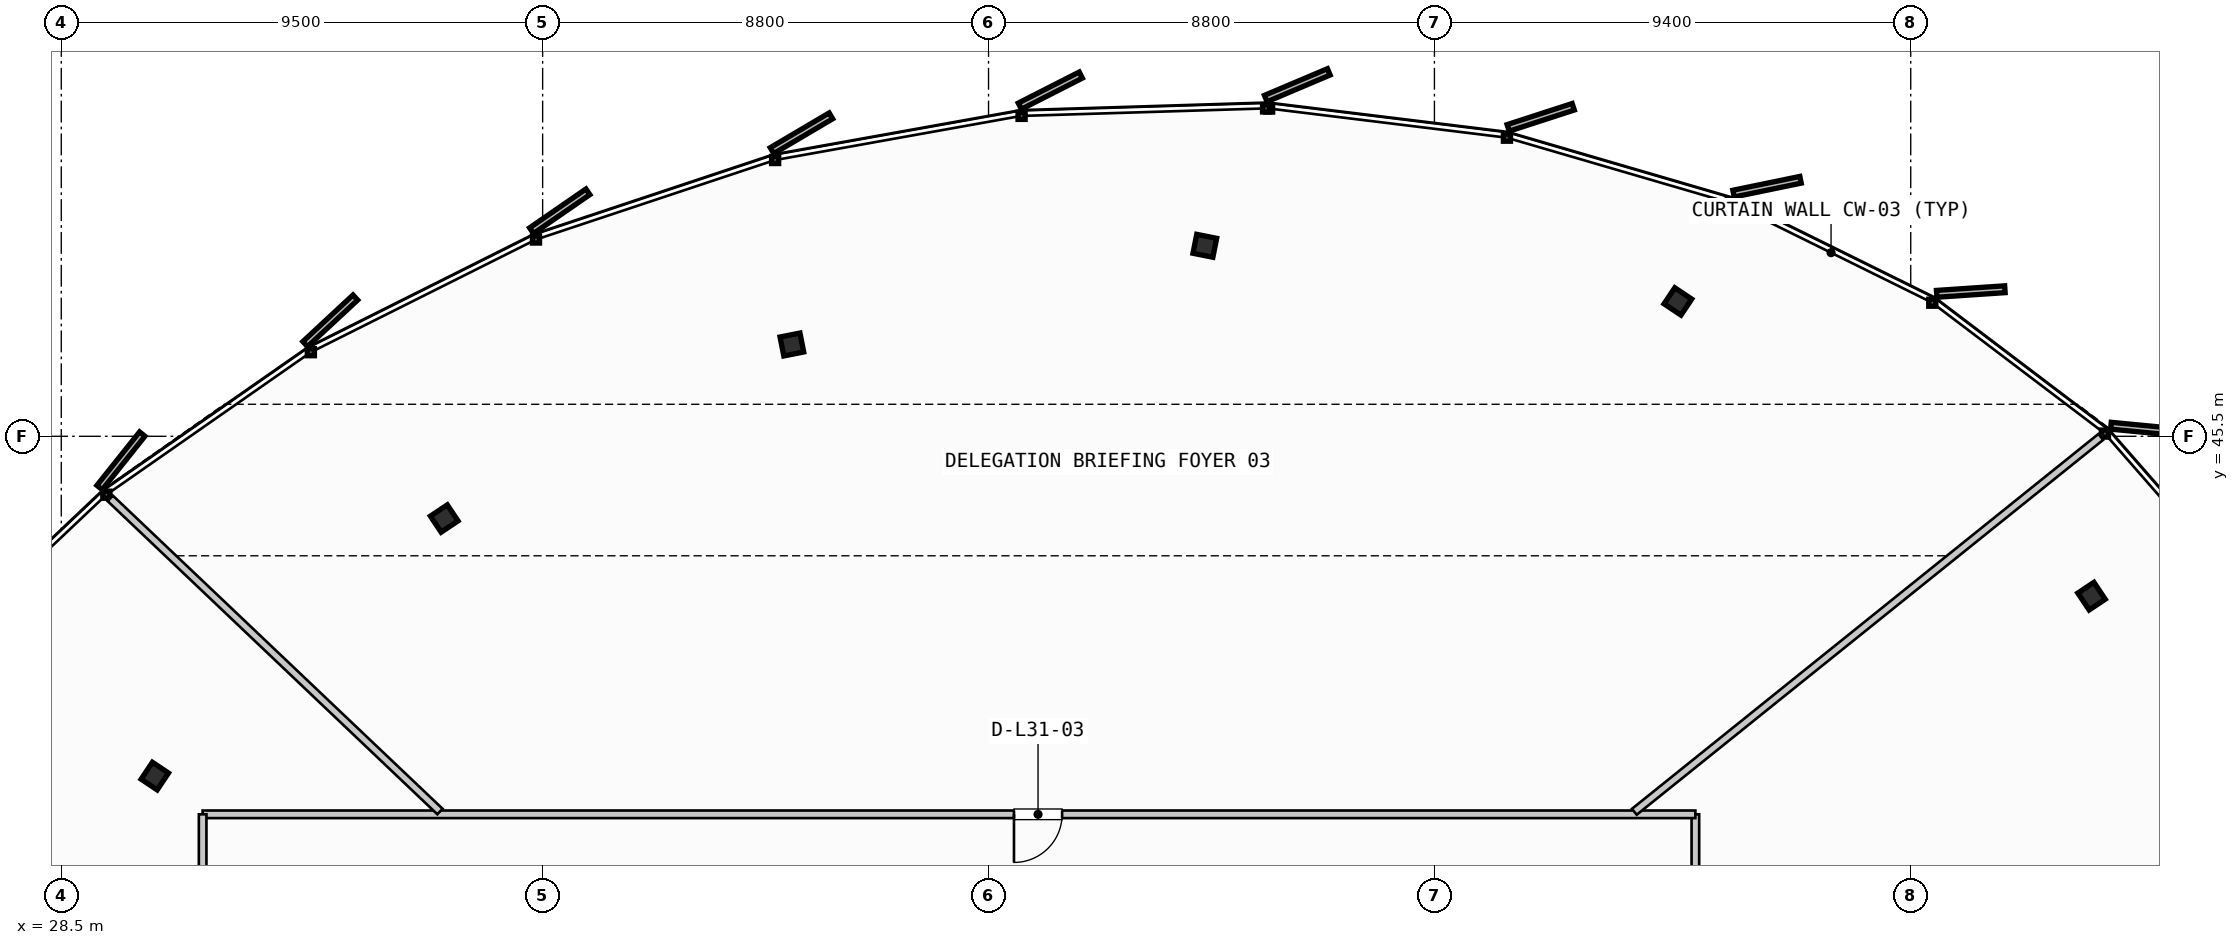
"""IFC4 building model, lengths in metres.
Left out: names, types, materials, properties, quantities, classifications, styles, units other than length and angle.
Written with IfcOpenShell. Run it as: python <this file> out.ifc"""

import sys

from ifc_helpers import new_model, si_unit, direction, frame, frame_2d, origin, origin_2d, place, context, subcontext, project, spatial, rectangle, i_section, extrude, source, transform, mapped, element, fill, save


model = new_model("IFC4")
c1 = context("Model", 3, precision=1e-05, world=origin(), true_north=direction((0.0, 1.0)))
c2 = subcontext(c1, "Body", "Model", "MODEL_VIEW")
j1 = project(units=[si_unit("LENGTHUNIT", "METRE"), si_unit("PLANEANGLEUNIT", "RADIAN")], contexts=[c1])
p1 = place(None, origin())
s1 = spatial("IfcSite", under=j1, at=p1, CompositionType="ELEMENT")
p2 = place(p1, origin())
s2 = spatial("IfcBuilding", under=s1, at=p2, CompositionType="ELEMENT")
p3 = place(p2, frame((0.0, 0.0, 125.2)))
s3 = spatial("IfcBuildingStorey", under=s2, at=p3, CompositionType="ELEMENT", Elevation=125.2)
m1 = source(origin(), c2, "Body", "SweptSolid", [
    extrude(i_section(OverallWidth=0.401, OverallDepth=0.381, WebThickness=0.032, FlangeThickness=0.051, FilletRadius=0.015, at=origin_2d()), origin(), (0.0, 0.0, 1.0), 3.35),
])
for number, where, z_axis, x_axis in (
    (1, (68.569, 42.345, 0.0), (0.0, 0.0, 1.0), (0.831, 0.556, 0.0)),
    (2, (60.405, 48.161, 0.0), (0.0, 0.0, 1.0), (0.556, 0.831, 0.0)),
    (3, (51.069, 49.259, 0.0), (0.0, 0.0, 1.0), (0.195, 0.981, 0.0)),
    (4, (42.919, 47.311, 0.0), (0.0, 0.0, 1.0), (-0.195, 0.981, 0.0)),
    (5, (36.058, 43.877, 0.0), (0.0, 0.0, 1.0), (-0.556, 0.831, 0.0)),
    (6, (30.346, 38.794, 0.0), (0.0, 0.0, 1.0), (-0.831, 0.556, 0.0)),
):
    element("IfcColumn", number, at=place(p3, frame(where, z_axis=z_axis, x_axis=x_axis)), inside=s3, PredefinedType="COLUMN", context=c2, shape_type="MappedRepresentation", body=[
        mapped(m1, transform((0.0, 0.0, 0.0), scale=1.0)),
    ])
p4 = place(p3, frame((60.75, 17.98, 0.0), z_axis=(0.0, 0.0, 1.0), x_axis=(0.0, 1.0, 0.0)))
e7 = element("IfcWall", 7, at=p4, inside=s3, PredefinedType="PARTITIONING", context=c2, shape_type="SweptSolid", body=[
    extrude(rectangle(XDim=20.06, YDim=0.15, at=frame_2d((10.03, 0.0))), origin(), (0.0, 0.0, 1.0), 2.635),
])
p5 = place(p4, frame((9.555, 0.0, 0.0)))
e8 = element("IfcOpeningElement", 8, at=p5, cuts=e7, PredefinedType="OPENING", context=c2, shape_type="SweptSolid", body=[
    extrude(rectangle(XDim=0.95, YDim=2.15, at=frame_2d((0.475, 1.075))), frame((0.0, 0.085, 0.0), z_axis=(0.0, -1.0, 0.0), x_axis=(1.0, 0.0, 0.0)), (0.0, 0.0, 1.0), 0.17),
])
p6 = place(p3, frame((60.75, 38.04, 0.0), z_axis=(0.0, 0.0, 1.0), x_axis=(-1.0, 0.0, 0.0)))
e9 = element("IfcWall", 9, at=p6, inside=s3, PredefinedType="PARTITIONING", context=c2, shape_type="SweptSolid", body=[
    extrude(rectangle(XDim=29.46, YDim=0.15, at=frame_2d((14.73, 0.0))), origin(), (0.0, 0.0, 1.0), 2.635),
])
p7 = place(p6, frame((12.498, 0.0, 0.0)))
e10 = element("IfcOpeningElement", 10, at=p7, cuts=e9, PredefinedType="OPENING", context=c2, shape_type="SweptSolid", body=[
    extrude(rectangle(XDim=0.95, YDim=2.15, at=frame_2d((0.475, 1.075))), frame((0.0, 0.085, 0.0), z_axis=(0.0, -1.0, 0.0), x_axis=(1.0, 0.0, 0.0)), (0.0, 0.0, 1.0), 0.17),
])
p8 = place(p3, frame((31.29, 38.04, 0.0), z_axis=(0.0, 0.0, 1.0), x_axis=(0.0, -1.0, 0.0)))
e11 = element("IfcWall", 11, at=p8, inside=s3, PredefinedType="PARTITIONING", context=c2, shape_type="SweptSolid", body=[
    extrude(rectangle(XDim=20.06, YDim=0.15, at=frame_2d((10.03, 0.0))), origin(), (0.0, 0.0, 1.0), 2.635),
])
p9 = place(p8, frame((4.552, 0.0, 0.0)))
e12 = element("IfcOpeningElement", 12, at=p9, cuts=e11, PredefinedType="OPENING", context=c2, shape_type="SweptSolid", body=[
    extrude(rectangle(XDim=0.95, YDim=2.15, at=frame_2d((0.475, 1.075))), frame((0.0, 0.085, 0.0), z_axis=(0.0, -1.0, 0.0), x_axis=(1.0, 0.0, 0.0)), (0.0, 0.0, 1.0), 0.17),
])
p10 = place(p8, frame((14.002, 0.0, 0.0)))
e13 = element("IfcOpeningElement", 13, at=p10, cuts=e11, PredefinedType="OPENING", context=c2, shape_type="SweptSolid", body=[
    extrude(rectangle(XDim=0.95, YDim=2.15, at=frame_2d((0.475, 1.075))), frame((0.0, 0.085, 0.0), z_axis=(0.0, -1.0, 0.0), x_axis=(1.0, 0.0, 0.0)), (0.0, 0.0, 1.0), 0.17),
])
p11 = place(p3, frame((59.546, 38.09, 0.0), z_axis=(0.0, 0.0, 1.0), x_axis=(0.779503527127, 0.626397837797, 0.0)))
e14 = element("IfcWall", 14, at=p11, inside=s3, PredefinedType="PARTITIONING", context=c2, shape_type="SweptSolid", body=[
    extrude(rectangle(XDim=11.81, YDim=0.15, at=frame_2d((5.905, 0.0))), origin(), (0.0, 0.0, 1.0), 2.635),
])
p12 = place(p3, frame((35.974, 38.095, 0.0), z_axis=(0.0, 0.0, 1.0), x_axis=(-0.725125759057, 0.688616463317, 0.0)))
e15 = element("IfcWall", 15, at=p12, inside=s3, PredefinedType="PARTITIONING", context=c2, shape_type="SweptSolid", body=[
    extrude(rectangle(XDim=8.974, YDim=0.15, at=frame_2d((4.487, 0.0))), origin(), (0.0, 0.0, 1.0), 2.635),
])
m2 = source(origin(), c2, "Body", "SweptSolid", [
    extrude(rectangle(XDim=0.95, YDim=2.15, at=frame_2d((0.475, 1.075))), frame((0.0, 0.025, 0.0), z_axis=(0.0, -1.0, 0.0), x_axis=(1.0, 0.0, 0.0)), (0.0, 0.0, 1.0), 0.05),
])
p13 = place(p7, origin())
e16 = element("IfcDoor", 16, at=p13, inside=s3, OperationType="SINGLE_SWING_RIGHT", PredefinedType="DOOR", context=c2, shape_type="MappedRepresentation", body=[
    mapped(m2, transform((0.0, 0.0, 0.0), scale=1.0)),
])
fill(e10, e16)
save(model, sys.argv[1])
